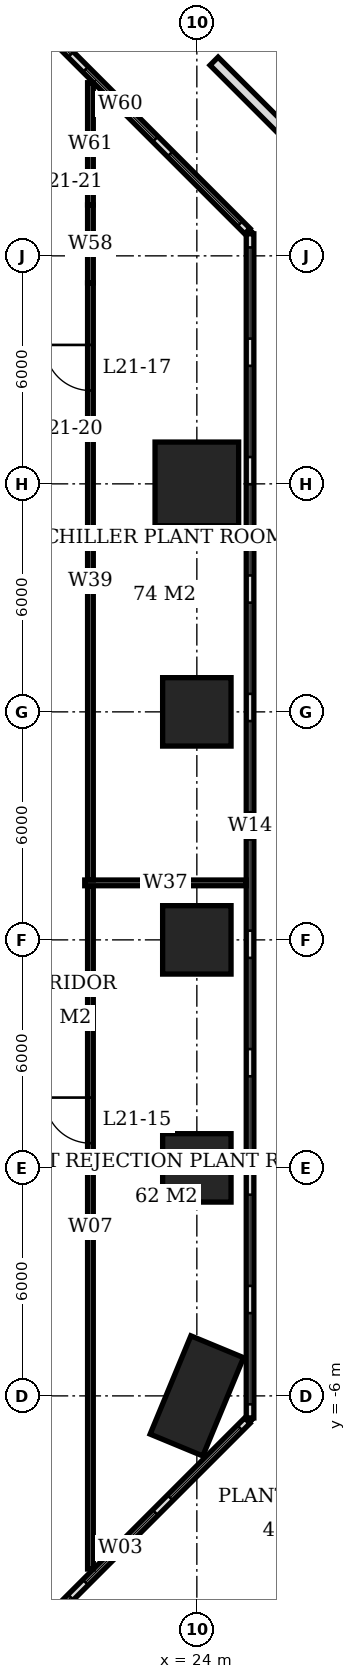
"""IFC4 building model, lengths in metres.
Left out: names, types, materials, properties, quantities, classifications, styles, units other than length and angle.
Written with IfcOpenShell. Run it as: python <this file> out.ifc"""

import sys

from ifc_helpers import new_model, si_unit, direction, frame, frame_2d, origin, origin_2d, place, context, subcontext, project, spatial, rectangle, extrude, element, fill, save


model = new_model("IFC4")
c1 = context("Model", 3, precision=1e-05, world=origin(), true_north=direction((0.0, 1.0)))
c2 = subcontext(c1, "Body", "Model", "MODEL_VIEW")
j1 = project(units=[si_unit("LENGTHUNIT", "METRE"), si_unit("PLANEANGLEUNIT", "RADIAN")], contexts=[c1])
p1 = place(None, origin())
s1 = spatial("IfcSite", under=j1, at=p1, CompositionType="ELEMENT")
p2 = place(p1, origin())
s2 = spatial("IfcBuilding", under=s1, at=p2, CompositionType="ELEMENT")
p3 = place(p2, frame((0.0, 0.0, 88.4)))
s3 = spatial("IfcBuildingStorey", under=s2, at=p3, CompositionType="ELEMENT", Elevation=88.4)
p4 = place(p3, frame((24.0, -6.0, 0.0), z_axis=(0.0, 0.0, 1.0), x_axis=(-0.382683432365, -0.923879532511, 0.0)))
e1 = element("IfcColumn", 1, at=p4, inside=s3, PredefinedType="COLUMN", context=c2, shape_type="SweptSolid", body=[
    extrude(rectangle(XDim=2.8, YDim=1.5, at=origin_2d()), origin(), (0.0, 0.0, 1.0), 5.4),
])
for number, where, z_axis, x_axis in (
    (2, (24.0, 0.0, 0.0), (0.0, 0.0, 1.0), (1.0, 0.0, 0.0)),
    (3, (24.0, 6.0, 0.0), (0.0, 0.0, 1.0), (1.0, 0.0, 0.0)),
    (4, (24.0, 12.0, 0.0), (0.0, 0.0, 1.0), (1.0, 0.0, 0.0)),
):
    element("IfcColumn", number, at=place(p3, frame(where, z_axis=z_axis, x_axis=x_axis)), inside=s3, PredefinedType="COLUMN", context=c2, shape_type="SweptSolid", body=[
        extrude(rectangle(XDim=1.8, YDim=1.8, at=origin_2d()), origin(), (0.0, 0.0, 1.0), 5.4),
    ])
p5 = place(p3, frame((24.0, 18.0, 0.0), z_axis=(0.0, 0.0, 1.0), x_axis=(1.0, 0.0, 0.0)))
e5 = element("IfcColumn", 5, at=p5, inside=s3, PredefinedType="COLUMN", context=c2, shape_type="SweptSolid", body=[
    extrude(rectangle(XDim=2.2, YDim=2.2, at=origin_2d()), origin(), (0.0, 0.0, 1.0), 5.4),
])
p6 = place(p3, frame((18.651, -13.329, 0.0), z_axis=(0.0, 0.0, 1.0), x_axis=(0.707106781187, 0.707106781187, 0.0)))
e6 = element("IfcWall", 6, at=p6, inside=s3, PredefinedType="USERDEFINED", context=c2, shape_type="SweptSolid", body=[
    extrude(rectangle(XDim=9.445, YDim=0.2, at=frame_2d((4.723, 0.0))), origin(), (0.0, 0.0, 1.0), 5.4),
])
p7 = place(p6, frame((0.274, 0.0, 0.6)))
e7 = element("IfcOpeningElement", 7, at=p7, cuts=e6, PredefinedType="OPENING", context=c2, shape_type="SweptSolid", body=[
    extrude(rectangle(XDim=2.6, YDim=3.0, at=frame_2d((1.3, 1.5))), frame((0.0, 0.11, 0.0), z_axis=(0.0, -1.0, 0.0), x_axis=(1.0, 0.0, 0.0)), (0.0, 0.0, 1.0), 0.22),
])
p8 = place(p6, frame((3.423, 0.0, 0.6)))
e8 = element("IfcOpeningElement", 8, at=p8, cuts=e6, PredefinedType="OPENING", context=c2, shape_type="SweptSolid", body=[
    extrude(rectangle(XDim=2.6, YDim=3.0, at=frame_2d((1.3, 1.5))), frame((0.0, 0.11, 0.0), z_axis=(0.0, -1.0, 0.0), x_axis=(1.0, 0.0, 0.0)), (0.0, 0.0, 1.0), 0.22),
])
p9 = place(p6, frame((6.571, 0.0, 0.6)))
e9 = element("IfcOpeningElement", 9, at=p9, cuts=e6, PredefinedType="OPENING", context=c2, shape_type="SweptSolid", body=[
    extrude(rectangle(XDim=2.6, YDim=3.0, at=frame_2d((1.3, 1.5))), frame((0.0, 0.11, 0.0), z_axis=(0.0, -1.0, 0.0), x_axis=(1.0, 0.0, 0.0)), (0.0, 0.0, 1.0), 0.22),
])
p10 = place(p3, frame((25.4, -6.58, 0.0), z_axis=(0.0, 0.0, 1.0), x_axis=(0.0, 1.0, 0.0)))
e10 = element("IfcWall", 10, at=p10, inside=s3, PredefinedType="USERDEFINED", context=c2, shape_type="SweptSolid", body=[
    extrude(rectangle(XDim=31.16, YDim=0.2, at=frame_2d((15.58, 0.0))), origin(), (0.0, 0.0, 1.0), 5.4),
])
p11 = place(p10, frame((0.358, 0.0, 0.6)))
e11 = element("IfcOpeningElement", 11, at=p11, cuts=e10, PredefinedType="OPENING", context=c2, shape_type="SweptSolid", body=[
    extrude(rectangle(XDim=2.4, YDim=3.0, at=frame_2d((1.2, 1.5))), frame((0.0, 0.11, 0.0), z_axis=(0.0, -1.0, 0.0), x_axis=(1.0, 0.0, 0.0)), (0.0, 0.0, 1.0), 0.22),
])
p12 = place(p10, frame((3.474, 0.0, 0.6)))
e12 = element("IfcOpeningElement", 12, at=p12, cuts=e10, PredefinedType="OPENING", context=c2, shape_type="SweptSolid", body=[
    extrude(rectangle(XDim=2.4, YDim=3.0, at=frame_2d((1.2, 1.5))), frame((0.0, 0.11, 0.0), z_axis=(0.0, -1.0, 0.0), x_axis=(1.0, 0.0, 0.0)), (0.0, 0.0, 1.0), 0.22),
])
p13 = place(p10, frame((6.59, 0.0, 0.6)))
e13 = element("IfcOpeningElement", 13, at=p13, cuts=e10, PredefinedType="OPENING", context=c2, shape_type="SweptSolid", body=[
    extrude(rectangle(XDim=2.4, YDim=3.0, at=frame_2d((1.2, 1.5))), frame((0.0, 0.11, 0.0), z_axis=(0.0, -1.0, 0.0), x_axis=(1.0, 0.0, 0.0)), (0.0, 0.0, 1.0), 0.22),
])
p14 = place(p10, frame((9.706, 0.0, 0.6)))
e14 = element("IfcOpeningElement", 14, at=p14, cuts=e10, PredefinedType="OPENING", context=c2, shape_type="SweptSolid", body=[
    extrude(rectangle(XDim=2.4, YDim=3.0, at=frame_2d((1.2, 1.5))), frame((0.0, 0.11, 0.0), z_axis=(0.0, -1.0, 0.0), x_axis=(1.0, 0.0, 0.0)), (0.0, 0.0, 1.0), 0.22),
])
p15 = place(p10, frame((12.822, 0.0, 0.6)))
e15 = element("IfcOpeningElement", 15, at=p15, cuts=e10, PredefinedType="OPENING", context=c2, shape_type="SweptSolid", body=[
    extrude(rectangle(XDim=2.4, YDim=3.0, at=frame_2d((1.2, 1.5))), frame((0.0, 0.11, 0.0), z_axis=(0.0, -1.0, 0.0), x_axis=(1.0, 0.0, 0.0)), (0.0, 0.0, 1.0), 0.22),
])
p16 = place(p10, frame((15.938, 0.0, 0.6)))
e16 = element("IfcOpeningElement", 16, at=p16, cuts=e10, PredefinedType="OPENING", context=c2, shape_type="SweptSolid", body=[
    extrude(rectangle(XDim=2.4, YDim=3.0, at=frame_2d((1.2, 1.5))), frame((0.0, 0.11, 0.0), z_axis=(0.0, -1.0, 0.0), x_axis=(1.0, 0.0, 0.0)), (0.0, 0.0, 1.0), 0.22),
])
p17 = place(p10, frame((19.054, 0.0, 0.6)))
e17 = element("IfcOpeningElement", 17, at=p17, cuts=e10, PredefinedType="OPENING", context=c2, shape_type="SweptSolid", body=[
    extrude(rectangle(XDim=2.4, YDim=3.0, at=frame_2d((1.2, 1.5))), frame((0.0, 0.11, 0.0), z_axis=(0.0, -1.0, 0.0), x_axis=(1.0, 0.0, 0.0)), (0.0, 0.0, 1.0), 0.22),
])
p18 = place(p10, frame((22.17, 0.0, 0.6)))
e18 = element("IfcOpeningElement", 18, at=p18, cuts=e10, PredefinedType="OPENING", context=c2, shape_type="SweptSolid", body=[
    extrude(rectangle(XDim=2.4, YDim=3.0, at=frame_2d((1.2, 1.5))), frame((0.0, 0.11, 0.0), z_axis=(0.0, -1.0, 0.0), x_axis=(1.0, 0.0, 0.0)), (0.0, 0.0, 1.0), 0.22),
])
p19 = place(p10, frame((25.286, 0.0, 0.6)))
e19 = element("IfcOpeningElement", 19, at=p19, cuts=e10, PredefinedType="OPENING", context=c2, shape_type="SweptSolid", body=[
    extrude(rectangle(XDim=2.4, YDim=3.0, at=frame_2d((1.2, 1.5))), frame((0.0, 0.11, 0.0), z_axis=(0.0, -1.0, 0.0), x_axis=(1.0, 0.0, 0.0)), (0.0, 0.0, 1.0), 0.22),
])
p20 = place(p10, frame((28.402, 0.0, 0.6)))
e20 = element("IfcOpeningElement", 20, at=p20, cuts=e10, PredefinedType="OPENING", context=c2, shape_type="SweptSolid", body=[
    extrude(rectangle(XDim=2.4, YDim=3.0, at=frame_2d((1.2, 1.5))), frame((0.0, 0.11, 0.0), z_axis=(0.0, -1.0, 0.0), x_axis=(1.0, 0.0, 0.0)), (0.0, 0.0, 1.0), 0.22),
])
p21 = place(p3, frame((25.329, 24.651, 0.0), z_axis=(0.0, 0.0, 1.0), x_axis=(-0.707106781187, 0.707106781187, 0.0)))
e21 = element("IfcWall", 21, at=p21, inside=s3, PredefinedType="USERDEFINED", context=c2, shape_type="SweptSolid", body=[
    extrude(rectangle(XDim=9.445, YDim=0.2, at=frame_2d((4.723, 0.0))), origin(), (0.0, 0.0, 1.0), 5.4),
])
p22 = place(p21, frame((0.274, 0.0, 0.6)))
e22 = element("IfcOpeningElement", 22, at=p22, cuts=e21, PredefinedType="OPENING", context=c2, shape_type="SweptSolid", body=[
    extrude(rectangle(XDim=2.6, YDim=3.0, at=frame_2d((1.3, 1.5))), frame((0.0, 0.11, 0.0), z_axis=(0.0, -1.0, 0.0), x_axis=(1.0, 0.0, 0.0)), (0.0, 0.0, 1.0), 0.22),
])
p23 = place(p21, frame((3.423, 0.0, 0.6)))
e23 = element("IfcOpeningElement", 23, at=p23, cuts=e21, PredefinedType="OPENING", context=c2, shape_type="SweptSolid", body=[
    extrude(rectangle(XDim=2.6, YDim=3.0, at=frame_2d((1.3, 1.5))), frame((0.0, 0.11, 0.0), z_axis=(0.0, -1.0, 0.0), x_axis=(1.0, 0.0, 0.0)), (0.0, 0.0, 1.0), 0.22),
])
p24 = place(p21, frame((6.571, 0.0, 0.6)))
e24 = element("IfcOpeningElement", 24, at=p24, cuts=e21, PredefinedType="OPENING", context=c2, shape_type="SweptSolid", body=[
    extrude(rectangle(XDim=2.6, YDim=3.0, at=frame_2d((1.3, 1.5))), frame((0.0, 0.11, 0.0), z_axis=(0.0, -1.0, 0.0), x_axis=(1.0, 0.0, 0.0)), (0.0, 0.0, 1.0), 0.22),
])
p25 = place(p3, frame((24.453, 29.123, 0.0), z_axis=(0.0, 0.0, 1.0), x_axis=(0.707106781187, -0.707106781187, 0.0)))
e25 = element("IfcWall", 25, at=p25, inside=s3, PredefinedType="USERDEFINED", context=c2, shape_type="SweptSolid", body=[
    extrude(rectangle(XDim=6.604, YDim=0.3, at=frame_2d((3.302, 0.0))), origin(), (0.0, 0.0, 1.0), 0.6),
])
p26 = place(p3, frame((21.2, -10.556, 0.0), z_axis=(0.0, 0.0, 1.0), x_axis=(0.0, 1.0, 0.0)))
e26 = element("IfcWall", 26, at=p26, inside=s3, PredefinedType="PARTITIONING", context=c2, shape_type="SweptSolid", body=[
    extrude(rectangle(XDim=17.981, YDim=0.15, at=frame_2d((8.99, 0.0))), origin(), (0.0, 0.0, 1.0), 5.15),
])
p27 = place(p26, frame((11.206, 0.0, 0.0)))
e27 = element("IfcOpeningElement", 27, at=p27, cuts=e26, PredefinedType="OPENING", context=c2, shape_type="SweptSolid", body=[
    extrude(rectangle(XDim=1.2, YDim=2.4, at=frame_2d((0.6, 1.2))), frame((0.0, 0.085, 0.0), z_axis=(0.0, -1.0, 0.0), x_axis=(1.0, 0.0, 0.0)), (0.0, 0.0, 1.0), 0.17),
])
p28 = place(p3, frame((21.2, 7.575, 0.0), z_axis=(0.0, 0.0, 1.0), x_axis=(0.0, 1.0, 0.0)))
e28 = element("IfcWall", 28, at=p28, inside=s3, PredefinedType="PARTITIONING", context=c2, shape_type="SweptSolid", body=[
    extrude(rectangle(XDim=15.715, YDim=0.15, at=frame_2d((7.857, 0.0))), origin(), (0.0, 0.0, 1.0), 5.15),
])
p29 = place(p28, frame((12.881, 0.0, 0.0)))
e29 = element("IfcOpeningElement", 29, at=p29, cuts=e28, PredefinedType="OPENING", context=c2, shape_type="SweptSolid", body=[
    extrude(rectangle(XDim=1.2, YDim=2.4, at=frame_2d((0.6, 1.2))), frame((0.0, 0.085, 0.0), z_axis=(0.0, -1.0, 0.0), x_axis=(1.0, 0.0, 0.0)), (0.0, 0.0, 1.0), 0.17),
])
p30 = place(p3, frame((21.2, 23.29, 0.0), z_axis=(0.0, 0.0, 1.0), x_axis=(0.0, 1.0, 0.0)))
e30 = element("IfcWall", 30, at=p30, inside=s3, PredefinedType="PARTITIONING", context=c2, shape_type="SweptSolid", body=[
    extrude(rectangle(XDim=2.05, YDim=0.15, at=frame_2d((1.025, 0.0))), origin(), (0.0, 0.0, 1.0), 4.15),
])
p31 = place(p3, frame((21.2, 25.34, 0.0), z_axis=(0.0, 0.0, 1.0), x_axis=(0.0, 1.0, 0.0)))
e31 = element("IfcWall", 31, at=p31, inside=s3, PredefinedType="PARTITIONING", context=c2, shape_type="SweptSolid", body=[
    extrude(rectangle(XDim=3.216, YDim=0.15, at=frame_2d((1.608, 0.0))), origin(), (0.0, 0.0, 1.0), 5.15),
])
p32 = place(p3, frame((21.05, 7.5, 0.0), z_axis=(0.0, 0.0, 1.0), x_axis=(1.0, 0.0, 0.0)))
e32 = element("IfcWall", 32, at=p32, inside=s3, PredefinedType="PARTITIONING", context=c2, shape_type="SweptSolid", body=[
    extrude(rectangle(XDim=4.25, YDim=0.15, at=frame_2d((2.125, 0.0))), origin(), (0.0, 0.0, 1.0), 5.15),
])
p33 = place(p7, origin())
e33 = element("IfcWindow", 33, at=p33, inside=s3, PartitioningType="SINGLE_PANEL", PredefinedType="USERDEFINED", context=c2, shape_type="SweptSolid", body=[
    extrude(rectangle(XDim=2.6, YDim=3.0, at=frame_2d((1.3, 1.5))), frame((0.0, 0.03, 0.0), z_axis=(0.0, -1.0, 0.0), x_axis=(1.0, 0.0, 0.0)), (0.0, 0.0, 1.0), 0.06),
])
fill(e7, e33)
p34 = place(p8, origin())
e34 = element("IfcWindow", 34, at=p34, inside=s3, PartitioningType="SINGLE_PANEL", PredefinedType="USERDEFINED", context=c2, shape_type="SweptSolid", body=[
    extrude(rectangle(XDim=2.6, YDim=3.0, at=frame_2d((1.3, 1.5))), frame((0.0, 0.03, 0.0), z_axis=(0.0, -1.0, 0.0), x_axis=(1.0, 0.0, 0.0)), (0.0, 0.0, 1.0), 0.06),
])
fill(e8, e34)
p35 = place(p9, origin())
e35 = element("IfcWindow", 35, at=p35, inside=s3, PartitioningType="SINGLE_PANEL", PredefinedType="USERDEFINED", context=c2, shape_type="SweptSolid", body=[
    extrude(rectangle(XDim=2.6, YDim=3.0, at=frame_2d((1.3, 1.5))), frame((0.0, 0.03, 0.0), z_axis=(0.0, -1.0, 0.0), x_axis=(1.0, 0.0, 0.0)), (0.0, 0.0, 1.0), 0.06),
])
fill(e9, e35)
p36 = place(p11, origin())
e36 = element("IfcWindow", 36, at=p36, inside=s3, PartitioningType="SINGLE_PANEL", PredefinedType="USERDEFINED", context=c2, shape_type="SweptSolid", body=[
    extrude(rectangle(XDim=2.4, YDim=3.0, at=frame_2d((1.2, 1.5))), frame((0.0, 0.03, 0.0), z_axis=(0.0, -1.0, 0.0), x_axis=(1.0, 0.0, 0.0)), (0.0, 0.0, 1.0), 0.06),
])
fill(e11, e36)
p37 = place(p12, origin())
e37 = element("IfcWindow", 37, at=p37, inside=s3, PartitioningType="SINGLE_PANEL", PredefinedType="USERDEFINED", context=c2, shape_type="SweptSolid", body=[
    extrude(rectangle(XDim=2.4, YDim=3.0, at=frame_2d((1.2, 1.5))), frame((0.0, 0.03, 0.0), z_axis=(0.0, -1.0, 0.0), x_axis=(1.0, 0.0, 0.0)), (0.0, 0.0, 1.0), 0.06),
])
fill(e12, e37)
p38 = place(p13, origin())
e38 = element("IfcWindow", 38, at=p38, inside=s3, PartitioningType="SINGLE_PANEL", PredefinedType="USERDEFINED", context=c2, shape_type="SweptSolid", body=[
    extrude(rectangle(XDim=2.4, YDim=3.0, at=frame_2d((1.2, 1.5))), frame((0.0, 0.03, 0.0), z_axis=(0.0, -1.0, 0.0), x_axis=(1.0, 0.0, 0.0)), (0.0, 0.0, 1.0), 0.06),
])
fill(e13, e38)
p39 = place(p14, origin())
e39 = element("IfcWindow", 39, at=p39, inside=s3, PartitioningType="SINGLE_PANEL", PredefinedType="USERDEFINED", context=c2, shape_type="SweptSolid", body=[
    extrude(rectangle(XDim=2.4, YDim=3.0, at=frame_2d((1.2, 1.5))), frame((0.0, 0.03, 0.0), z_axis=(0.0, -1.0, 0.0), x_axis=(1.0, 0.0, 0.0)), (0.0, 0.0, 1.0), 0.06),
])
fill(e14, e39)
p40 = place(p15, origin())
e40 = element("IfcWindow", 40, at=p40, inside=s3, PartitioningType="SINGLE_PANEL", PredefinedType="USERDEFINED", context=c2, shape_type="SweptSolid", body=[
    extrude(rectangle(XDim=2.4, YDim=3.0, at=frame_2d((1.2, 1.5))), frame((0.0, 0.03, 0.0), z_axis=(0.0, -1.0, 0.0), x_axis=(1.0, 0.0, 0.0)), (0.0, 0.0, 1.0), 0.06),
])
fill(e15, e40)
p41 = place(p16, origin())
e41 = element("IfcWindow", 41, at=p41, inside=s3, PartitioningType="SINGLE_PANEL", PredefinedType="USERDEFINED", context=c2, shape_type="SweptSolid", body=[
    extrude(rectangle(XDim=2.4, YDim=3.0, at=frame_2d((1.2, 1.5))), frame((0.0, 0.03, 0.0), z_axis=(0.0, -1.0, 0.0), x_axis=(1.0, 0.0, 0.0)), (0.0, 0.0, 1.0), 0.06),
])
fill(e16, e41)
p42 = place(p17, origin())
e42 = element("IfcWindow", 42, at=p42, inside=s3, PartitioningType="SINGLE_PANEL", PredefinedType="USERDEFINED", context=c2, shape_type="SweptSolid", body=[
    extrude(rectangle(XDim=2.4, YDim=3.0, at=frame_2d((1.2, 1.5))), frame((0.0, 0.03, 0.0), z_axis=(0.0, -1.0, 0.0), x_axis=(1.0, 0.0, 0.0)), (0.0, 0.0, 1.0), 0.06),
])
fill(e17, e42)
p43 = place(p18, origin())
e43 = element("IfcWindow", 43, at=p43, inside=s3, PartitioningType="SINGLE_PANEL", PredefinedType="USERDEFINED", context=c2, shape_type="SweptSolid", body=[
    extrude(rectangle(XDim=2.4, YDim=3.0, at=frame_2d((1.2, 1.5))), frame((0.0, 0.03, 0.0), z_axis=(0.0, -1.0, 0.0), x_axis=(1.0, 0.0, 0.0)), (0.0, 0.0, 1.0), 0.06),
])
fill(e18, e43)
p44 = place(p19, origin())
e44 = element("IfcWindow", 44, at=p44, inside=s3, PartitioningType="SINGLE_PANEL", PredefinedType="USERDEFINED", context=c2, shape_type="SweptSolid", body=[
    extrude(rectangle(XDim=2.4, YDim=3.0, at=frame_2d((1.2, 1.5))), frame((0.0, 0.03, 0.0), z_axis=(0.0, -1.0, 0.0), x_axis=(1.0, 0.0, 0.0)), (0.0, 0.0, 1.0), 0.06),
])
fill(e19, e44)
p45 = place(p20, origin())
e45 = element("IfcWindow", 45, at=p45, inside=s3, PartitioningType="SINGLE_PANEL", PredefinedType="USERDEFINED", context=c2, shape_type="SweptSolid", body=[
    extrude(rectangle(XDim=2.4, YDim=3.0, at=frame_2d((1.2, 1.5))), frame((0.0, 0.03, 0.0), z_axis=(0.0, -1.0, 0.0), x_axis=(1.0, 0.0, 0.0)), (0.0, 0.0, 1.0), 0.06),
])
fill(e20, e45)
p46 = place(p22, origin())
e46 = element("IfcWindow", 46, at=p46, inside=s3, PartitioningType="SINGLE_PANEL", PredefinedType="USERDEFINED", context=c2, shape_type="SweptSolid", body=[
    extrude(rectangle(XDim=2.6, YDim=3.0, at=frame_2d((1.3, 1.5))), frame((0.0, 0.03, 0.0), z_axis=(0.0, -1.0, 0.0), x_axis=(1.0, 0.0, 0.0)), (0.0, 0.0, 1.0), 0.06),
])
fill(e22, e46)
p47 = place(p23, origin())
e47 = element("IfcWindow", 47, at=p47, inside=s3, PartitioningType="SINGLE_PANEL", PredefinedType="USERDEFINED", context=c2, shape_type="SweptSolid", body=[
    extrude(rectangle(XDim=2.6, YDim=3.0, at=frame_2d((1.3, 1.5))), frame((0.0, 0.03, 0.0), z_axis=(0.0, -1.0, 0.0), x_axis=(1.0, 0.0, 0.0)), (0.0, 0.0, 1.0), 0.06),
])
fill(e23, e47)
p48 = place(p24, origin())
e48 = element("IfcWindow", 48, at=p48, inside=s3, PartitioningType="SINGLE_PANEL", PredefinedType="USERDEFINED", context=c2, shape_type="SweptSolid", body=[
    extrude(rectangle(XDim=2.6, YDim=3.0, at=frame_2d((1.3, 1.5))), frame((0.0, 0.03, 0.0), z_axis=(0.0, -1.0, 0.0), x_axis=(1.0, 0.0, 0.0)), (0.0, 0.0, 1.0), 0.06),
])
fill(e24, e48)
p49 = place(p27, origin())
e49 = element("IfcDoor", 49, at=p49, inside=s3, OperationType="SINGLE_SWING_RIGHT", PredefinedType="DOOR", context=c2, shape_type="SweptSolid", body=[
    extrude(rectangle(XDim=1.2, YDim=2.4, at=frame_2d((0.6, 1.2))), frame((0.0, 0.025, 0.0), z_axis=(0.0, -1.0, 0.0), x_axis=(1.0, 0.0, 0.0)), (0.0, 0.0, 1.0), 0.05),
])
fill(e27, e49)
p50 = place(p29, origin())
e50 = element("IfcDoor", 50, at=p50, inside=s3, OperationType="SINGLE_SWING_RIGHT", PredefinedType="DOOR", context=c2, shape_type="SweptSolid", body=[
    extrude(rectangle(XDim=1.2, YDim=2.4, at=frame_2d((0.6, 1.2))), frame((0.0, 0.025, 0.0), z_axis=(0.0, -1.0, 0.0), x_axis=(1.0, 0.0, 0.0)), (0.0, 0.0, 1.0), 0.05),
])
fill(e29, e50)
save(model, sys.argv[1])
